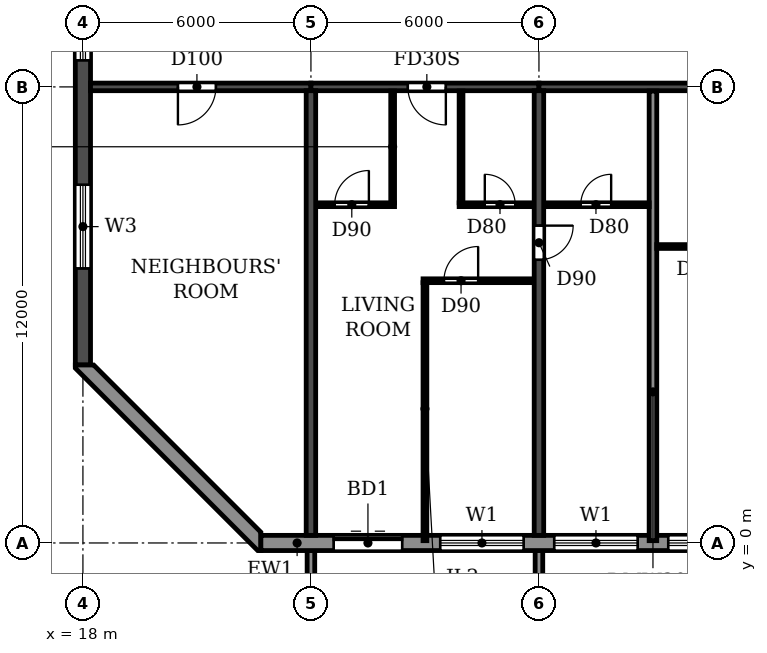
"""IFC4 building model, lengths in metres.
Left out: names, types, materials, properties, quantities, classifications, styles, units other than length and angle.
Written with IfcOpenShell. Run it as: python <this file> out.ifc"""

import sys

from ifc_helpers import new_model, si_unit, direction, frame, frame_2d, origin, place, context, subcontext, project, spatial, polyline, rectangle, outline, extrude, source, transform, mapped, element, fill, save


model = new_model("IFC4")
c1 = context("Model", 3, precision=1e-05, world=origin(), true_north=direction((0.0, 1.0)))
c2 = subcontext(c1, "Body", "Model", "MODEL_VIEW")
j1 = project(units=[si_unit("LENGTHUNIT", "METRE"), si_unit("PLANEANGLEUNIT", "RADIAN")], contexts=[c1])
p1 = place(None, origin())
s1 = spatial("IfcSite", under=j1, at=p1, CompositionType="ELEMENT")
p2 = place(p1, origin())
s2 = spatial("IfcBuilding", under=s1, at=p2, CompositionType="ELEMENT")
p3 = place(p2, frame((0.0, 0.0, 231.3)))
s3 = spatial("IfcBuildingStorey", under=s2, at=p3, CompositionType="ELEMENT", Elevation=231.3)
p4 = place(p3, frame((24.0, 0.2, 0.0), z_axis=(0.0, 0.0, 1.0), x_axis=(0.0, 1.0, 0.0)))
e1 = element("IfcWall", 1, at=p4, inside=s3, PredefinedType="SHEAR", context=c2, shape_type="SweptSolid", body=[
    extrude(rectangle(XDim=11.7, YDim=0.25, at=frame_2d((5.85, 0.0))), origin(), (0.0, 0.0, 1.0), 3.08),
])
p5 = place(p3, frame((30.0, 0.2, 0.0), z_axis=(0.0, 0.0, 1.0), x_axis=(0.0, 1.0, 0.0)))
e2 = element("IfcWall", 2, at=p5, inside=s3, PredefinedType="SHEAR", context=c2, shape_type="SweptSolid", body=[
    extrude(rectangle(XDim=11.7, YDim=0.25, at=frame_2d((5.85, 0.0))), origin(), (0.0, 0.0, 1.0), 3.08),
])
p6 = place(p5, frame((7.25, 0.0, 0.0)))
e3 = element("IfcOpeningElement", 3, at=p6, cuts=e2, PredefinedType="OPENING", context=c2, shape_type="SweptSolid", body=[
    extrude(rectangle(XDim=0.9, YDim=2.1, at=frame_2d((0.45, 1.05))), frame((0.0, 0.135, 0.0), z_axis=(0.0, -1.0, 0.0), x_axis=(1.0, 0.0, 0.0)), (0.0, 0.0, 1.0), 0.27),
])
p7 = place(p3, frame((18.0, 4.683, 0.0), z_axis=(0.0, 0.0, 1.0), x_axis=(0.0, 1.0, 0.0)))
e4 = element("IfcWall", 4, at=p7, inside=s3, PredefinedType="SHEAR", context=c2, shape_type="SweptSolid", body=[
    extrude(rectangle(XDim=31.834, YDim=0.4, at=frame_2d((15.917, 0.0))), origin(), (0.0, 0.0, 1.0), 3.08),
])
p8 = place(p7, frame((23.817, 0.0, 0.9)))
e5 = element("IfcOpeningElement", 5, at=p8, cuts=e4, PredefinedType="OPENING", context=c2, shape_type="SweptSolid", body=[
    extrude(rectangle(XDim=1.2, YDim=1.5, at=frame_2d((0.6, 0.75))), frame((0.0, 0.21, 0.0), z_axis=(0.0, -1.0, 0.0), x_axis=(1.0, 0.0, 0.0)), (0.0, 0.0, 1.0), 0.42),
])
p9 = place(p7, frame((8.017, 0.0, 0.9)))
e6 = element("IfcOpeningElement", 6, at=p9, cuts=e4, PredefinedType="OPENING", context=c2, shape_type="SweptSolid", body=[
    extrude(rectangle(XDim=1.2, YDim=1.5, at=frame_2d((0.6, 0.75))), frame((0.0, 0.21, 0.0), z_axis=(0.0, -1.0, 0.0), x_axis=(1.0, 0.0, 0.0)), (0.0, 0.0, 1.0), 0.42),
])
p10 = place(p7, frame((27.694, 0.0, 0.6)))
e7 = element("IfcOpeningElement", 7, at=p10, cuts=e4, PredefinedType="OPENING", context=c2, shape_type="SweptSolid", body=[
    extrude(rectangle(XDim=2.2, YDim=1.8, at=frame_2d((1.1, 0.9))), frame((0.0, 0.21, 0.0), z_axis=(0.0, -1.0, 0.0), x_axis=(1.0, 0.0, 0.0)), (0.0, 0.0, 1.0), 0.42),
])
p11 = place(p7, frame((2.541, 0.0, 0.6)))
e8 = element("IfcOpeningElement", 8, at=p11, cuts=e4, PredefinedType="OPENING", context=c2, shape_type="SweptSolid", body=[
    extrude(rectangle(XDim=2.2, YDim=1.8, at=frame_2d((1.1, 0.9))), frame((0.0, 0.21, 0.0), z_axis=(0.0, -1.0, 0.0), x_axis=(1.0, 0.0, 0.0)), (0.0, 0.0, 1.0), 0.42),
])
p12 = place(p7, frame((15.917, 0.0, 0.9)))
e9 = element("IfcOpeningElement", 9, at=p12, cuts=e4, PredefinedType="OPENING", context=c2, shape_type="SweptSolid", body=[
    extrude(rectangle(XDim=1.2, YDim=1.5, at=frame_2d((0.6, 0.75))), frame((0.0, 0.21, 0.0), z_axis=(0.0, -1.0, 0.0), x_axis=(1.0, 0.0, 0.0)), (0.0, 0.0, 1.0), 0.42),
])
p13 = place(p3, frame((18.2, 12.0, 0.0), z_axis=(0.0, 0.0, 1.0), x_axis=(1.0, 0.0, 0.0)))
e10 = element("IfcWall", 10, at=p13, inside=s3, PredefinedType="SHEAR", context=c2, shape_type="SweptSolid", body=[
    extrude(rectangle(XDim=5.8, YDim=0.2, at=frame_2d((2.9, 0.0))), origin(), (0.0, 0.0, 1.0), 2.48),
])
p14 = place(p13, frame((2.3, 0.0, 0.0)))
e11 = element("IfcOpeningElement", 11, at=p14, cuts=e10, PredefinedType="OPENING", context=c2, shape_type="SweptSolid", body=[
    extrude(rectangle(XDim=1.0, YDim=2.1, at=frame_2d((0.5, 1.05))), frame((0.0, 0.11, 0.0), z_axis=(0.0, -1.0, 0.0), x_axis=(1.0, 0.0, 0.0)), (0.0, 0.0, 1.0), 0.22),
])
p15 = place(p3, frame((24.0, 12.0, 0.0), z_axis=(0.0, 0.0, 1.0), x_axis=(1.0, 0.0, 0.0)))
e12 = element("IfcWall", 12, at=p15, inside=s3, PredefinedType="SHEAR", context=c2, shape_type="SweptSolid", body=[
    extrude(rectangle(XDim=6.0, YDim=0.2, at=frame_2d((3.0, 0.0))), origin(), (0.0, 0.0, 1.0), 2.48),
])
p16 = place(p15, frame((2.55, 0.0, 0.0)))
e13 = element("IfcOpeningElement", 13, at=p16, cuts=e12, PredefinedType="OPENING", context=c2, shape_type="SweptSolid", body=[
    extrude(rectangle(XDim=1.0, YDim=2.1, at=frame_2d((0.5, 1.05))), frame((0.0, 0.11, 0.0), z_axis=(0.0, -1.0, 0.0), x_axis=(1.0, 0.0, 0.0)), (0.0, 0.0, 1.0), 0.22),
])
p17 = place(p3, frame((30.0, 12.0, 0.0), z_axis=(0.0, 0.0, 1.0), x_axis=(1.0, 0.0, 0.0)))
e14 = element("IfcWall", 14, at=p17, inside=s3, PredefinedType="SHEAR", context=c2, shape_type="SweptSolid", body=[
    extrude(rectangle(XDim=6.0, YDim=0.2, at=frame_2d((3.0, 0.0))), origin(), (0.0, 0.0, 1.0), 2.48),
])
p18 = place(p3, frame((22.683, 0.0, 0.0), z_axis=(0.0, 0.0, 1.0), x_axis=(1.0, 0.0, 0.0)))
e15 = element("IfcWall", 15, at=p18, inside=s3, PredefinedType="STANDARD", context=c2, shape_type="SweptSolid", body=[
    extrude(rectangle(XDim=56.634, YDim=0.4, at=frame_2d((28.317, 0.0))), origin(), (0.0, 0.0, 1.0), 3.08),
])
p19 = place(p18, frame((1.917, 0.0, 0.0)))
e16 = element("IfcOpeningElement", 16, at=p19, cuts=e15, PredefinedType="OPENING", context=c2, shape_type="SweptSolid", body=[
    extrude(rectangle(XDim=1.8, YDim=2.4, at=frame_2d((0.9, 1.2))), frame((0.0, 0.21, 0.0), z_axis=(0.0, -1.0, 0.0), x_axis=(1.0, 0.0, 0.0)), (0.0, 0.0, 1.0), 0.42),
])
p20 = place(p18, frame((4.717, 0.0, 0.9)))
e17 = element("IfcOpeningElement", 17, at=p20, cuts=e15, PredefinedType="OPENING", context=c2, shape_type="SweptSolid", body=[
    extrude(rectangle(XDim=2.2, YDim=1.5, at=frame_2d((1.1, 0.75))), frame((0.0, 0.21, 0.0), z_axis=(0.0, -1.0, 0.0), x_axis=(1.0, 0.0, 0.0)), (0.0, 0.0, 1.0), 0.42),
])
p21 = place(p18, frame((7.717, 0.0, 0.9)))
e18 = element("IfcOpeningElement", 18, at=p21, cuts=e15, PredefinedType="OPENING", context=c2, shape_type="SweptSolid", body=[
    extrude(rectangle(XDim=2.2, YDim=1.5, at=frame_2d((1.1, 0.75))), frame((0.0, 0.21, 0.0), z_axis=(0.0, -1.0, 0.0), x_axis=(1.0, 0.0, 0.0)), (0.0, 0.0, 1.0), 0.42),
])
p22 = place(p18, frame((10.717, 0.0, 0.9)))
e19 = element("IfcOpeningElement", 19, at=p22, cuts=e15, PredefinedType="OPENING", context=c2, shape_type="SweptSolid", body=[
    extrude(rectangle(XDim=2.2, YDim=1.5, at=frame_2d((1.1, 0.75))), frame((0.0, 0.21, 0.0), z_axis=(0.0, -1.0, 0.0), x_axis=(1.0, 0.0, 0.0)), (0.0, 0.0, 1.0), 0.42),
])
p23 = place(p18, frame((13.717, 0.0, 0.9)))
e20 = element("IfcOpeningElement", 20, at=p23, cuts=e15, PredefinedType="OPENING", context=c2, shape_type="SweptSolid", body=[
    extrude(rectangle(XDim=2.2, YDim=1.5, at=frame_2d((1.1, 0.75))), frame((0.0, 0.21, 0.0), z_axis=(0.0, -1.0, 0.0), x_axis=(1.0, 0.0, 0.0)), (0.0, 0.0, 1.0), 0.42),
])
p24 = place(p18, frame((16.917, 0.0, 0.0)))
e21 = element("IfcOpeningElement", 21, at=p24, cuts=e15, PredefinedType="OPENING", context=c2, shape_type="SweptSolid", body=[
    extrude(rectangle(XDim=1.8, YDim=2.4, at=frame_2d((0.9, 1.2))), frame((0.0, 0.21, 0.0), z_axis=(0.0, -1.0, 0.0), x_axis=(1.0, 0.0, 0.0)), (0.0, 0.0, 1.0), 0.42),
])
p25 = place(p18, frame((19.717, 0.0, 0.9)))
e22 = element("IfcOpeningElement", 22, at=p25, cuts=e15, PredefinedType="OPENING", context=c2, shape_type="SweptSolid", body=[
    extrude(rectangle(XDim=2.2, YDim=1.5, at=frame_2d((1.1, 0.75))), frame((0.0, 0.21, 0.0), z_axis=(0.0, -1.0, 0.0), x_axis=(1.0, 0.0, 0.0)), (0.0, 0.0, 1.0), 0.42),
])
p26 = place(p18, frame((22.717, 0.0, 0.9)))
e23 = element("IfcOpeningElement", 23, at=p26, cuts=e15, PredefinedType="OPENING", context=c2, shape_type="SweptSolid", body=[
    extrude(rectangle(XDim=2.2, YDim=1.5, at=frame_2d((1.1, 0.75))), frame((0.0, 0.21, 0.0), z_axis=(0.0, -1.0, 0.0), x_axis=(1.0, 0.0, 0.0)), (0.0, 0.0, 1.0), 0.42),
])
p27 = place(p18, frame((25.917, 0.0, 0.0)))
e24 = element("IfcOpeningElement", 24, at=p27, cuts=e15, PredefinedType="OPENING", context=c2, shape_type="SweptSolid", body=[
    extrude(rectangle(XDim=1.8, YDim=2.4, at=frame_2d((0.9, 1.2))), frame((0.0, 0.21, 0.0), z_axis=(0.0, -1.0, 0.0), x_axis=(1.0, 0.0, 0.0)), (0.0, 0.0, 1.0), 0.42),
])
p28 = place(p18, frame((28.717, 0.0, 0.9)))
e25 = element("IfcOpeningElement", 25, at=p28, cuts=e15, PredefinedType="OPENING", context=c2, shape_type="SweptSolid", body=[
    extrude(rectangle(XDim=2.2, YDim=1.5, at=frame_2d((1.1, 0.75))), frame((0.0, 0.21, 0.0), z_axis=(0.0, -1.0, 0.0), x_axis=(1.0, 0.0, 0.0)), (0.0, 0.0, 1.0), 0.42),
])
p29 = place(p18, frame((31.717, 0.0, 0.9)))
e26 = element("IfcOpeningElement", 26, at=p29, cuts=e15, PredefinedType="OPENING", context=c2, shape_type="SweptSolid", body=[
    extrude(rectangle(XDim=2.2, YDim=1.5, at=frame_2d((1.1, 0.75))), frame((0.0, 0.21, 0.0), z_axis=(0.0, -1.0, 0.0), x_axis=(1.0, 0.0, 0.0)), (0.0, 0.0, 1.0), 0.42),
])
p30 = place(p18, frame((34.717, 0.0, 0.9)))
e27 = element("IfcOpeningElement", 27, at=p30, cuts=e15, PredefinedType="OPENING", context=c2, shape_type="SweptSolid", body=[
    extrude(rectangle(XDim=2.2, YDim=1.5, at=frame_2d((1.1, 0.75))), frame((0.0, 0.21, 0.0), z_axis=(0.0, -1.0, 0.0), x_axis=(1.0, 0.0, 0.0)), (0.0, 0.0, 1.0), 0.42),
])
p31 = place(p18, frame((37.717, 0.0, 0.9)))
e28 = element("IfcOpeningElement", 28, at=p31, cuts=e15, PredefinedType="OPENING", context=c2, shape_type="SweptSolid", body=[
    extrude(rectangle(XDim=2.2, YDim=1.5, at=frame_2d((1.1, 0.75))), frame((0.0, 0.21, 0.0), z_axis=(0.0, -1.0, 0.0), x_axis=(1.0, 0.0, 0.0)), (0.0, 0.0, 1.0), 0.42),
])
p32 = place(p18, frame((40.917, 0.0, 0.0)))
e29 = element("IfcOpeningElement", 29, at=p32, cuts=e15, PredefinedType="OPENING", context=c2, shape_type="SweptSolid", body=[
    extrude(rectangle(XDim=1.8, YDim=2.4, at=frame_2d((0.9, 1.2))), frame((0.0, 0.21, 0.0), z_axis=(0.0, -1.0, 0.0), x_axis=(1.0, 0.0, 0.0)), (0.0, 0.0, 1.0), 0.42),
])
p33 = place(p18, frame((43.717, 0.0, 0.9)))
e30 = element("IfcOpeningElement", 30, at=p33, cuts=e15, PredefinedType="OPENING", context=c2, shape_type="SweptSolid", body=[
    extrude(rectangle(XDim=2.2, YDim=1.5, at=frame_2d((1.1, 0.75))), frame((0.0, 0.21, 0.0), z_axis=(0.0, -1.0, 0.0), x_axis=(1.0, 0.0, 0.0)), (0.0, 0.0, 1.0), 0.42),
])
p34 = place(p18, frame((46.717, 0.0, 0.9)))
e31 = element("IfcOpeningElement", 31, at=p34, cuts=e15, PredefinedType="OPENING", context=c2, shape_type="SweptSolid", body=[
    extrude(rectangle(XDim=2.2, YDim=1.5, at=frame_2d((1.1, 0.75))), frame((0.0, 0.21, 0.0), z_axis=(0.0, -1.0, 0.0), x_axis=(1.0, 0.0, 0.0)), (0.0, 0.0, 1.0), 0.42),
])
p35 = place(p18, frame((49.717, 0.0, 0.9)))
e32 = element("IfcOpeningElement", 32, at=p35, cuts=e15, PredefinedType="OPENING", context=c2, shape_type="SweptSolid", body=[
    extrude(rectangle(XDim=2.2, YDim=1.5, at=frame_2d((1.1, 0.75))), frame((0.0, 0.21, 0.0), z_axis=(0.0, -1.0, 0.0), x_axis=(1.0, 0.0, 0.0)), (0.0, 0.0, 1.0), 0.42),
])
p36 = place(p18, frame((52.717, 0.0, 0.9)))
e33 = element("IfcOpeningElement", 33, at=p36, cuts=e15, PredefinedType="OPENING", context=c2, shape_type="SweptSolid", body=[
    extrude(rectangle(XDim=2.2, YDim=1.5, at=frame_2d((1.1, 0.75))), frame((0.0, 0.21, 0.0), z_axis=(0.0, -1.0, 0.0), x_axis=(1.0, 0.0, 0.0)), (0.0, 0.0, 1.0), 0.42),
])
p37 = place(p3, origin())
e34 = element("IfcWall", 34, at=p37, inside=s3, PredefinedType="STANDARD", context=c2, shape_type="SweptSolid", body=[
    extrude(outline(polyline([(17.8, 4.683), (17.8, 4.6), (22.6, -0.2), (22.683, -0.2), (22.683, 0.283), (18.283, 4.683), (17.8, 4.683)])), origin(), (0.0, 0.0, 1.0), 3.08),
])
m1 = source(origin(), c2, "Body", "SweptSolid", [
    extrude(outline(polyline([(0.0, 0.0), (0.2, 0.0), (0.2, 1.65), (0.0, 1.65), (0.0, 0.0)])), origin(), (0.0, 0.0, 1.0), 3.1),
])
for number, where in (
    (35, (23.9, -1.85, 0.0)),
    (36, (29.9, -1.85, 0.0)),
):
    element("IfcWall", number, at=place(p3, frame(where)), inside=s3, PredefinedType="STANDARD", context=c2, shape_type="MappedRepresentation", body=[
        mapped(m1, transform((0.0, 0.0, 0.0))),
    ])
p38 = place(p3, frame((33.0, 0.06, 0.0), z_axis=(0.0, 0.0, 1.0), x_axis=(0.0, 1.0, 0.0)))
e37 = element("IfcWall", 37, at=p38, inside=s3, PredefinedType="PARTITIONING", context=c2, shape_type="SweptSolid", body=[
    extrude(rectangle(XDim=11.83, YDim=0.2, at=frame_2d((5.915, 0.0))), origin(), (0.0, 0.0, 1.0), 3.08),
])
p39 = place(p3, frame((26.95, 6.9, 0.0), z_axis=(0.0, 0.0, 1.0), x_axis=(1.0, 0.0, 0.0)))
e38 = element("IfcWall", 38, at=p39, inside=s3, PredefinedType="PARTITIONING", context=c2, shape_type="SweptSolid", body=[
    extrude(rectangle(XDim=2.915, YDim=0.1, at=frame_2d((1.458, 0.0))), origin(), (0.0, 0.0, 1.0), 3.08),
])
p40 = place(p39, frame((0.55, 0.0, 0.0)))
e39 = element("IfcOpeningElement", 39, at=p40, cuts=e38, PredefinedType="OPENING", context=c2, shape_type="SweptSolid", body=[
    extrude(rectangle(XDim=0.9, YDim=2.1, at=frame_2d((0.45, 1.05))), frame((0.0, 0.06, 0.0), z_axis=(0.0, -1.0, 0.0), x_axis=(1.0, 0.0, 0.0)), (0.0, 0.0, 1.0), 0.12),
])
p41 = place(p3, frame((33.1, 7.8, 0.0), z_axis=(0.0, 0.0, 1.0), x_axis=(1.0, 0.0, 0.0)))
e40 = element("IfcWall", 40, at=p41, inside=s3, PredefinedType="PARTITIONING", context=c2, shape_type="SweptSolid", body=[
    extrude(rectangle(XDim=2.765, YDim=0.1, at=frame_2d((1.382, 0.0))), origin(), (0.0, 0.0, 1.0), 3.08),
])
p42 = place(p41, frame((1.0, 0.0, 0.0)))
e41 = element("IfcOpeningElement", 41, at=p42, cuts=e40, PredefinedType="OPENING", context=c2, shape_type="SweptSolid", body=[
    extrude(rectangle(XDim=0.8, YDim=2.1, at=frame_2d((0.4, 1.05))), frame((0.0, 0.06, 0.0), z_axis=(0.0, -1.0, 0.0), x_axis=(1.0, 0.0, 0.0)), (0.0, 0.0, 1.0), 0.12),
])
p43 = place(p3, frame((24.135, 8.9, 0.0), z_axis=(0.0, 0.0, 1.0), x_axis=(1.0, 0.0, 0.0)))
e42 = element("IfcWall", 42, at=p43, inside=s3, PredefinedType="PARTITIONING", context=c2, shape_type="SweptSolid", body=[
    extrude(rectangle(XDim=2.065, YDim=0.1, at=frame_2d((1.032, 0.0))), origin(), (0.0, 0.0, 1.0), 3.08),
])
p44 = place(p43, frame((0.49, 0.0, 0.0)))
e43 = element("IfcOpeningElement", 43, at=p44, cuts=e42, PredefinedType="OPENING", context=c2, shape_type="SweptSolid", body=[
    extrude(rectangle(XDim=0.9, YDim=2.1, at=frame_2d((0.45, 1.05))), frame((0.0, 0.06, 0.0), z_axis=(0.0, -1.0, 0.0), x_axis=(1.0, 0.0, 0.0)), (0.0, 0.0, 1.0), 0.12),
])
p45 = place(p3, frame((27.9, 8.9, 0.0), z_axis=(0.0, 0.0, 1.0), x_axis=(1.0, 0.0, 0.0)))
e44 = element("IfcWall", 44, at=p45, inside=s3, PredefinedType="PARTITIONING", context=c2, shape_type="SweptSolid", body=[
    extrude(rectangle(XDim=1.965, YDim=0.1, at=frame_2d((0.982, 0.0))), origin(), (0.0, 0.0, 1.0), 3.08),
])
p46 = place(p45, frame((0.675, 0.0, 0.0)))
e45 = element("IfcOpeningElement", 45, at=p46, cuts=e44, PredefinedType="OPENING", context=c2, shape_type="SweptSolid", body=[
    extrude(rectangle(XDim=0.8, YDim=2.1, at=frame_2d((0.4, 1.05))), frame((0.0, 0.06, 0.0), z_axis=(0.0, -1.0, 0.0), x_axis=(1.0, 0.0, 0.0)), (0.0, 0.0, 1.0), 0.12),
])
p47 = place(p3, frame((30.135, 8.9, 0.0), z_axis=(0.0, 0.0, 1.0), x_axis=(1.0, 0.0, 0.0)))
e46 = element("IfcWall", 46, at=p47, inside=s3, PredefinedType="PARTITIONING", context=c2, shape_type="SweptSolid", body=[
    extrude(rectangle(XDim=2.765, YDim=0.1, at=frame_2d((1.382, 0.0))), origin(), (0.0, 0.0, 1.0), 3.08),
])
p48 = place(p47, frame((0.965, 0.0, 0.0)))
e47 = element("IfcOpeningElement", 47, at=p48, cuts=e46, PredefinedType="OPENING", context=c2, shape_type="SweptSolid", body=[
    extrude(rectangle(XDim=0.8, YDim=2.1, at=frame_2d((0.4, 1.05))), frame((0.0, 0.06, 0.0), z_axis=(0.0, -1.0, 0.0), x_axis=(1.0, 0.0, 0.0)), (0.0, 0.0, 1.0), 0.12),
])
p49 = place(p3, frame((26.15, 8.95, 0.0), z_axis=(0.0, 0.0, 1.0), x_axis=(0.0, 1.0, 0.0)))
e48 = element("IfcWall", 48, at=p49, inside=s3, PredefinedType="PARTITIONING", context=c2, shape_type="SweptSolid", body=[
    extrude(rectangle(XDim=2.94, YDim=0.1, at=frame_2d((1.47, 0.0))), origin(), (0.0, 0.0, 1.0), 3.08),
])
p50 = place(p3, frame((27.0, 0.06, 0.0), z_axis=(0.0, 0.0, 1.0), x_axis=(0.0, 1.0, 0.0)))
e49 = element("IfcWall", 49, at=p50, inside=s3, PredefinedType="PARTITIONING", context=c2, shape_type="SweptSolid", body=[
    extrude(rectangle(XDim=6.79, YDim=0.1, at=frame_2d((3.395, 0.0))), origin(), (0.0, 0.0, 1.0), 3.08),
])
p51 = place(p3, frame((27.95, 8.95, 0.0), z_axis=(0.0, 0.0, 1.0), x_axis=(0.0, 1.0, 0.0)))
e50 = element("IfcWall", 50, at=p51, inside=s3, PredefinedType="PARTITIONING", context=c2, shape_type="SweptSolid", body=[
    extrude(rectangle(XDim=2.94, YDim=0.1, at=frame_2d((1.47, 0.0))), origin(), (0.0, 0.0, 1.0), 3.08),
])
p52 = place(p19, origin())
e51 = element("IfcDoor", 51, at=p52, inside=s3, OperationType="DOUBLE_DOOR_SLIDING", PredefinedType="DOOR", context=c2, shape_type="SweptSolid", body=[
    extrude(rectangle(XDim=1.8, YDim=2.4, at=frame_2d((0.9, 1.2))), frame((0.0, 0.025, 0.0), z_axis=(0.0, -1.0, 0.0), x_axis=(1.0, 0.0, 0.0)), (0.0, 0.0, 1.0), 0.05),
])
fill(e16, e51)
p53 = place(p20, origin())
e52 = element("IfcWindow", 52, at=p53, inside=s3, PartitioningType="DOUBLE_PANEL_HORIZONTAL", PredefinedType="WINDOW", context=c2, shape_type="SweptSolid", body=[
    extrude(rectangle(XDim=2.2, YDim=1.5, at=frame_2d((1.1, 0.75))), frame((0.0, 0.03, 0.0), z_axis=(0.0, -1.0, 0.0), x_axis=(1.0, 0.0, 0.0)), (0.0, 0.0, 1.0), 0.06),
])
fill(e17, e52)
p54 = place(p21, origin())
e53 = element("IfcWindow", 53, at=p54, inside=s3, PartitioningType="DOUBLE_PANEL_HORIZONTAL", PredefinedType="WINDOW", context=c2, shape_type="SweptSolid", body=[
    extrude(rectangle(XDim=2.2, YDim=1.5, at=frame_2d((1.1, 0.75))), frame((0.0, 0.03, 0.0), z_axis=(0.0, -1.0, 0.0), x_axis=(1.0, 0.0, 0.0)), (0.0, 0.0, 1.0), 0.06),
])
fill(e18, e53)
p55 = place(p22, origin())
e54 = element("IfcWindow", 54, at=p55, inside=s3, PartitioningType="DOUBLE_PANEL_HORIZONTAL", PredefinedType="WINDOW", context=c2, shape_type="SweptSolid", body=[
    extrude(rectangle(XDim=2.2, YDim=1.5, at=frame_2d((1.1, 0.75))), frame((0.0, 0.03, 0.0), z_axis=(0.0, -1.0, 0.0), x_axis=(1.0, 0.0, 0.0)), (0.0, 0.0, 1.0), 0.06),
])
fill(e19, e54)
p56 = place(p9, origin())
e55 = element("IfcWindow", 55, at=p56, inside=s3, PartitioningType="SINGLE_PANEL", PredefinedType="WINDOW", context=c2, shape_type="SweptSolid", body=[
    extrude(rectangle(XDim=1.2, YDim=1.5, at=frame_2d((0.6, 0.75))), frame((0.0, 0.03, 0.0), z_axis=(0.0, -1.0, 0.0), x_axis=(1.0, 0.0, 0.0)), (0.0, 0.0, 1.0), 0.06),
])
fill(e6, e55)
p57 = place(p11, origin())
e56 = element("IfcWindow", 56, at=p57, inside=s3, PartitioningType="DOUBLE_PANEL_HORIZONTAL", PredefinedType="WINDOW", context=c2, shape_type="SweptSolid", body=[
    extrude(rectangle(XDim=2.2, YDim=1.8, at=frame_2d((1.1, 0.9))), frame((0.0, 0.03, 0.0), z_axis=(0.0, -1.0, 0.0), x_axis=(1.0, 0.0, 0.0)), (0.0, 0.0, 1.0), 0.06),
])
fill(e8, e56)
p58 = place(p14, frame((1.0, 0.0, 0.0), z_axis=(0.0, 0.0, 1.0), x_axis=(-1.0, 0.0, 0.0)))
e57 = element("IfcDoor", 57, at=p58, inside=s3, OperationType="SINGLE_SWING_RIGHT", PredefinedType="DOOR", context=c2, shape_type="SweptSolid", body=[
    extrude(rectangle(XDim=1.0, YDim=2.1, at=frame_2d((0.5, 1.05))), frame((0.0, 0.025, 0.0), z_axis=(0.0, -1.0, 0.0), x_axis=(1.0, 0.0, 0.0)), (0.0, 0.0, 1.0), 0.05),
])
fill(e11, e57)
p59 = place(p48, origin())
e58 = element("IfcDoor", 58, at=p59, inside=s3, OperationType="SINGLE_SWING_RIGHT", PredefinedType="DOOR", context=c2, shape_type="SweptSolid", body=[
    extrude(rectangle(XDim=0.8, YDim=2.1, at=frame_2d((0.4, 1.05))), frame((0.0, 0.025, 0.0), z_axis=(0.0, -1.0, 0.0), x_axis=(1.0, 0.0, 0.0)), (0.0, 0.0, 1.0), 0.05),
])
fill(e47, e58)
p60 = place(p44, origin())
e59 = element("IfcDoor", 59, at=p60, inside=s3, OperationType="SINGLE_SWING_RIGHT", PredefinedType="DOOR", context=c2, shape_type="SweptSolid", body=[
    extrude(rectangle(XDim=0.9, YDim=2.1, at=frame_2d((0.45, 1.05))), frame((0.0, 0.025, 0.0), z_axis=(0.0, -1.0, 0.0), x_axis=(1.0, 0.0, 0.0)), (0.0, 0.0, 1.0), 0.05),
])
fill(e43, e59)
p61 = place(p16, frame((1.0, 0.0, 0.0), z_axis=(0.0, 0.0, 1.0), x_axis=(-1.0, 0.0, 0.0)))
e60 = element("IfcDoor", 60, at=p61, inside=s3, OperationType="SINGLE_SWING_LEFT", PredefinedType="DOOR", context=c2, shape_type="SweptSolid", body=[
    extrude(rectangle(XDim=1.0, YDim=2.1, at=frame_2d((0.5, 1.05))), frame((0.0, 0.025, 0.0), z_axis=(0.0, -1.0, 0.0), x_axis=(1.0, 0.0, 0.0)), (0.0, 0.0, 1.0), 0.05),
])
fill(e13, e60)
p62 = place(p40, origin())
e61 = element("IfcDoor", 61, at=p62, inside=s3, OperationType="SINGLE_SWING_RIGHT", PredefinedType="DOOR", context=c2, shape_type="SweptSolid", body=[
    extrude(rectangle(XDim=0.9, YDim=2.1, at=frame_2d((0.45, 1.05))), frame((0.0, 0.025, 0.0), z_axis=(0.0, -1.0, 0.0), x_axis=(1.0, 0.0, 0.0)), (0.0, 0.0, 1.0), 0.05),
])
fill(e39, e61)
p63 = place(p46, origin())
e62 = element("IfcDoor", 62, at=p63, inside=s3, OperationType="SINGLE_SWING_LEFT", PredefinedType="DOOR", context=c2, shape_type="SweptSolid", body=[
    extrude(rectangle(XDim=0.8, YDim=2.1, at=frame_2d((0.4, 1.05))), frame((0.0, 0.025, 0.0), z_axis=(0.0, -1.0, 0.0), x_axis=(1.0, 0.0, 0.0)), (0.0, 0.0, 1.0), 0.05),
])
fill(e45, e62)
p64 = place(p6, frame((0.9, 0.0, 0.0), z_axis=(0.0, 0.0, 1.0), x_axis=(-1.0, 0.0, 0.0)))
e63 = element("IfcDoor", 63, at=p64, inside=s3, OperationType="SINGLE_SWING_LEFT", PredefinedType="DOOR", context=c2, shape_type="SweptSolid", body=[
    extrude(rectangle(XDim=0.9, YDim=2.1, at=frame_2d((0.45, 1.05))), frame((0.0, 0.025, 0.0), z_axis=(0.0, -1.0, 0.0), x_axis=(1.0, 0.0, 0.0)), (0.0, 0.0, 1.0), 0.05),
])
fill(e3, e63)
save(model, sys.argv[1])
